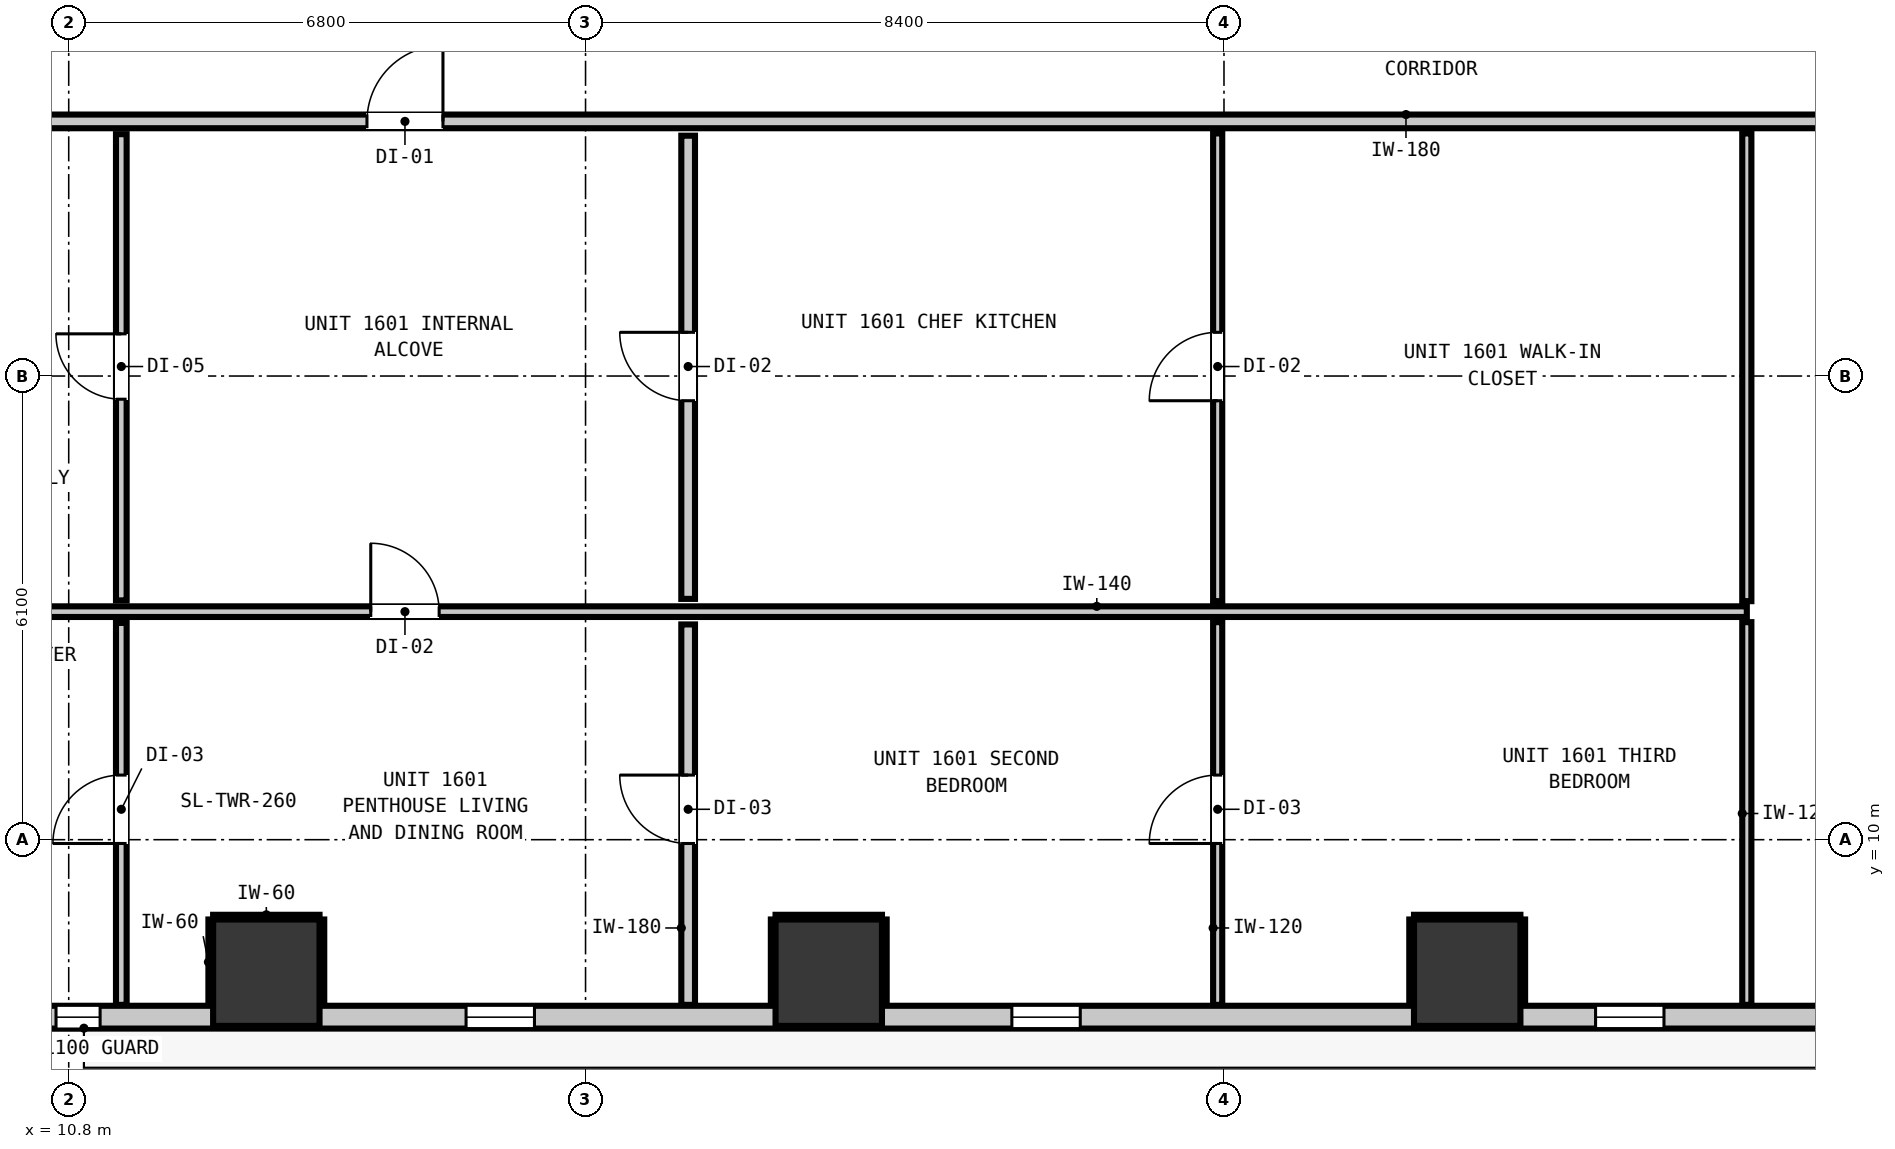
"""IFC4 building model, lengths in metres.
Left out: names, types, materials, properties, quantities, classifications, styles, units other than length and angle.
Written with IfcOpenShell. Run it as: python <this file> out.ifc"""

import sys

from ifc_helpers import new_model, si_unit, direction, frame, frame_2d, origin, origin_2d, place, context, subcontext, project, spatial, rectangle, extrude, element, fill, save


model = new_model("IFC4")
c1 = context("Model", 3, precision=1e-05, world=origin(), true_north=direction((0.0, 1.0)))
c2 = subcontext(c1, "Body", "Model", "MODEL_VIEW")
j1 = project(units=[si_unit("LENGTHUNIT", "METRE"), si_unit("PLANEANGLEUNIT", "RADIAN")], contexts=[c1])
p1 = place(None, origin())
s1 = spatial("IfcSite", under=j1, at=p1, CompositionType="ELEMENT")
p2 = place(p1, origin())
s2 = spatial("IfcBuilding", under=s1, at=p2, CompositionType="ELEMENT")
p3 = place(p2, frame((0.0, 0.0, 58.52)))
s3 = spatial("IfcBuildingStorey", under=s2, at=p3, CompositionType="ELEMENT", Elevation=58.52)
for number, where, z_axis, x_axis in (
    (1, (13.4, 8.25, 0.0), (0.0, 0.0, 1.0), (1.0, 0.0, 0.0)),
    (2, (20.8, 8.25, 0.0), (0.0, 0.0, 1.0), (1.0, 0.0, 0.0)),
    (3, (29.2, 8.25, 0.0), (0.0, 0.0, 1.0), (1.0, 0.0, 0.0)),
):
    element("IfcColumn", number, at=place(p3, frame(where, z_axis=z_axis, x_axis=x_axis)), inside=s3, PredefinedType="COLUMN", context=c2, shape_type="SweptSolid", body=[
        extrude(rectangle(XDim=1.4, YDim=1.4, at=origin_2d()), origin(), (0.0, 0.0, 1.0), 2.9),
    ])
p4 = place(p3, frame((47.835, 7.665, 0.0), z_axis=(0.0, 0.0, 1.0), x_axis=(-1.0, 0.0, 0.0)))
e4 = element("IfcWall", 4, at=p4, inside=s3, PredefinedType="STANDARD", context=c2, shape_type="SweptSolid", body=[
    extrude(rectangle(XDim=37.47, YDim=0.3, at=frame_2d((18.735, 0.0))), origin(), (0.0, 0.0, 1.0), 2.9),
])
p5 = place(p4, frame((0.901, 0.0, 0.0)))
e5 = element("IfcOpeningElement", 5, at=p5, cuts=e4, PredefinedType="OPENING", context=c2, shape_type="SweptSolid", body=[
    extrude(rectangle(XDim=1.0, YDim=2.15, at=frame_2d((0.5, 1.075))), frame((0.0, 0.16, 0.0), z_axis=(0.0, -1.0, 0.0), x_axis=(1.0, 0.0, 0.0)), (0.0, 0.0, 1.0), 0.32),
])
p6 = place(p4, frame((30.907, 0.0, 0.85)))
e6 = element("IfcOpeningElement", 6, at=p6, cuts=e4, PredefinedType="OPENING", context=c2, shape_type="SweptSolid", body=[
    extrude(rectangle(XDim=0.9, YDim=1.5, at=frame_2d((0.45, 0.75))), frame((0.0, 0.16, 0.0), z_axis=(0.0, -1.0, 0.0), x_axis=(1.0, 0.0, 0.0)), (0.0, 0.0, 1.0), 0.32),
])
p7 = place(p4, frame((36.622, 0.0, 0.85)))
e7 = element("IfcOpeningElement", 7, at=p7, cuts=e4, PredefinedType="OPENING", context=c2, shape_type="SweptSolid", body=[
    extrude(rectangle(XDim=0.58, YDim=1.5, at=frame_2d((0.29, 0.75))), frame((0.0, 0.16, 0.0), z_axis=(0.0, -1.0, 0.0), x_axis=(1.0, 0.0, 0.0)), (0.0, 0.0, 1.0), 0.32),
])
p8 = place(p4, frame((23.726, 0.0, 0.85)))
e8 = element("IfcOpeningElement", 8, at=p8, cuts=e4, PredefinedType="OPENING", context=c2, shape_type="SweptSolid", body=[
    extrude(rectangle(XDim=0.9, YDim=1.5, at=frame_2d((0.45, 0.75))), frame((0.0, 0.16, 0.0), z_axis=(0.0, -1.0, 0.0), x_axis=(1.0, 0.0, 0.0)), (0.0, 0.0, 1.0), 0.32),
])
p9 = place(p4, frame((16.046, 0.0, 0.85)))
e9 = element("IfcOpeningElement", 9, at=p9, cuts=e4, PredefinedType="OPENING", context=c2, shape_type="SweptSolid", body=[
    extrude(rectangle(XDim=0.9, YDim=1.5, at=frame_2d((0.45, 0.75))), frame((0.0, 0.16, 0.0), z_axis=(0.0, -1.0, 0.0), x_axis=(1.0, 0.0, 0.0)), (0.0, 0.0, 1.0), 0.32),
])
p10 = place(p4, frame((5.918, 0.0, 0.85)))
e10 = element("IfcOpeningElement", 10, at=p10, cuts=e4, PredefinedType="OPENING", context=c2, shape_type="SweptSolid", body=[
    extrude(rectangle(XDim=0.9, YDim=1.5, at=frame_2d((0.45, 0.75))), frame((0.0, 0.16, 0.0), z_axis=(0.0, -1.0, 0.0), x_axis=(1.0, 0.0, 0.0)), (0.0, 0.0, 1.0), 0.32),
])
p11 = place(p3, frame((8.027, 19.45, 0.0), z_axis=(0.0, 0.0, 1.0), x_axis=(1.0, 0.0, 0.0)))
e11 = element("IfcWall", 11, at=p11, inside=s3, PredefinedType="PARTITIONING", context=c2, shape_type="SweptSolid", body=[
    extrude(rectangle(XDim=42.146, YDim=0.18, at=frame_2d((21.073, 0.0))), origin(), (0.0, 0.0, 1.0), 2.9),
])
p12 = place(p11, frame((6.697, 0.0, 0.0)))
e12 = element("IfcOpeningElement", 12, at=p12, cuts=e11, PredefinedType="OPENING", context=c2, shape_type="SweptSolid", body=[
    extrude(rectangle(XDim=1.0, YDim=2.15, at=frame_2d((0.5, 1.075))), frame((0.0, 0.1, 0.0), z_axis=(0.0, -1.0, 0.0), x_axis=(1.0, 0.0, 0.0)), (0.0, 0.0, 1.0), 0.2),
])
p13 = place(p11, frame((33.038, 0.0, 0.0)))
e13 = element("IfcOpeningElement", 13, at=p13, cuts=e11, PredefinedType="OPENING", context=c2, shape_type="SweptSolid", body=[
    extrude(rectangle(XDim=0.9, YDim=2.1, at=frame_2d((0.45, 1.05))), frame((0.0, 0.1, 0.0), z_axis=(0.0, -1.0, 0.0), x_axis=(1.0, 0.0, 0.0)), (0.0, 0.0, 1.0), 0.2),
])
p14 = place(p3, frame((8.027, 13.0, 0.0), z_axis=(0.0, 0.0, 1.0), x_axis=(1.0, 0.0, 0.0)))
e14 = element("IfcWall", 14, at=p14, inside=s3, PredefinedType="PARTITIONING", context=c2, shape_type="SweptSolid", body=[
    extrude(rectangle(XDim=24.852, YDim=0.14, at=frame_2d((12.426, 0.0))), origin(), (0.0, 0.0, 1.0), 2.9),
])
p15 = place(p14, frame((6.747, 0.0, 0.0)))
e15 = element("IfcOpeningElement", 15, at=p15, cuts=e14, PredefinedType="OPENING", context=c2, shape_type="SweptSolid", body=[
    extrude(rectangle(XDim=0.9, YDim=2.1, at=frame_2d((0.45, 1.05))), frame((0.0, 0.08, 0.0), z_axis=(0.0, -1.0, 0.0), x_axis=(1.0, 0.0, 0.0)), (0.0, 0.0, 1.0), 0.16),
])
p16 = place(p3, frame((18.95, 7.827, 0.0), z_axis=(0.0, 0.0, 1.0), x_axis=(0.0, 1.0, 0.0)))
e16 = element("IfcWall", 16, at=p16, inside=s3, PredefinedType="PARTITIONING", context=c2, shape_type="SweptSolid", body=[
    extrude(rectangle(XDim=5.005, YDim=0.18, at=frame_2d((2.502, 0.0))), origin(), (0.0, 0.0, 1.0), 2.9),
])
p17 = place(p16, frame((2.123, 0.0, 0.0)))
e17 = element("IfcOpeningElement", 17, at=p17, cuts=e16, PredefinedType="OPENING", context=c2, shape_type="SweptSolid", body=[
    extrude(rectangle(XDim=0.9, YDim=2.1, at=frame_2d((0.45, 1.05))), frame((0.0, 0.1, 0.0), z_axis=(0.0, -1.0, 0.0), x_axis=(1.0, 0.0, 0.0)), (0.0, 0.0, 1.0), 0.2),
])
p18 = place(p3, frame((18.95, 13.168, 0.0), z_axis=(0.0, 0.0, 1.0), x_axis=(0.0, 1.0, 0.0)))
e18 = element("IfcWall", 18, at=p18, inside=s3, PredefinedType="PARTITIONING", context=c2, shape_type="SweptSolid", body=[
    extrude(rectangle(XDim=6.094, YDim=0.18, at=frame_2d((3.047, 0.0))), origin(), (0.0, 0.0, 1.0), 2.9),
])
p19 = place(p18, frame((2.607, 0.0, 0.0)))
e19 = element("IfcOpeningElement", 19, at=p19, cuts=e18, PredefinedType="OPENING", context=c2, shape_type="SweptSolid", body=[
    extrude(rectangle(XDim=0.9, YDim=2.1, at=frame_2d((0.45, 1.05))), frame((0.0, 0.1, 0.0), z_axis=(0.0, -1.0, 0.0), x_axis=(1.0, 0.0, 0.0)), (0.0, 0.0, 1.0), 0.2),
])
p20 = place(p3, frame((11.492, 7.827, 0.0), z_axis=(0.0, 0.0, 1.0), x_axis=(0.0, 1.0, 0.0)))
e20 = element("IfcWall", 20, at=p20, inside=s3, PredefinedType="PARTITIONING", context=c2, shape_type="SweptSolid", body=[
    extrude(rectangle(XDim=5.025, YDim=0.14, at=frame_2d((2.513, 0.0))), origin(), (0.0, 0.0, 1.0), 2.9),
])
p21 = place(p20, frame((2.123, 0.0, 0.0)))
e21 = element("IfcOpeningElement", 21, at=p21, cuts=e20, PredefinedType="OPENING", context=c2, shape_type="SweptSolid", body=[
    extrude(rectangle(XDim=0.9, YDim=2.1, at=frame_2d((0.45, 1.05))), frame((0.0, 0.08, 0.0), z_axis=(0.0, -1.0, 0.0), x_axis=(1.0, 0.0, 0.0)), (0.0, 0.0, 1.0), 0.16),
])
p22 = place(p3, frame((11.492, 13.148, 0.0), z_axis=(0.0, 0.0, 1.0), x_axis=(0.0, 1.0, 0.0)))
e22 = element("IfcWall", 22, at=p22, inside=s3, PredefinedType="PARTITIONING", context=c2, shape_type="SweptSolid", body=[
    extrude(rectangle(XDim=6.134, YDim=0.14, at=frame_2d((3.067, 0.0))), origin(), (0.0, 0.0, 1.0), 2.9),
])
p23 = place(p22, frame((2.647, 0.0, 0.0)))
e23 = element("IfcOpeningElement", 23, at=p23, cuts=e22, PredefinedType="OPENING", context=c2, shape_type="SweptSolid", body=[
    extrude(rectangle(XDim=0.86, YDim=2.02, at=frame_2d((0.43, 1.01))), frame((0.0, 0.08, 0.0), z_axis=(0.0, -1.0, 0.0), x_axis=(1.0, 0.0, 0.0)), (0.0, 0.0, 1.0), 0.16),
])
p24 = place(p3, frame((25.917, 7.827, 0.0), z_axis=(0.0, 0.0, 1.0), x_axis=(0.0, 1.0, 0.0)))
e24 = element("IfcWall", 24, at=p24, inside=s3, PredefinedType="PARTITIONING", context=c2, shape_type="SweptSolid", body=[
    extrude(rectangle(XDim=5.035, YDim=0.12, at=frame_2d((2.518, 0.0))), origin(), (0.0, 0.0, 1.0), 2.9),
])
p25 = place(p24, frame((2.123, 0.0, 0.0)))
e25 = element("IfcOpeningElement", 25, at=p25, cuts=e24, PredefinedType="OPENING", context=c2, shape_type="SweptSolid", body=[
    extrude(rectangle(XDim=0.9, YDim=2.1, at=frame_2d((0.45, 1.05))), frame((0.0, 0.07, 0.0), z_axis=(0.0, -1.0, 0.0), x_axis=(1.0, 0.0, 0.0)), (0.0, 0.0, 1.0), 0.14),
])
p26 = place(p3, frame((25.917, 13.138, 0.0), z_axis=(0.0, 0.0, 1.0), x_axis=(0.0, 1.0, 0.0)))
e26 = element("IfcWall", 26, at=p26, inside=s3, PredefinedType="PARTITIONING", context=c2, shape_type="SweptSolid", body=[
    extrude(rectangle(XDim=6.154, YDim=0.12, at=frame_2d((3.077, 0.0))), origin(), (0.0, 0.0, 1.0), 2.9),
])
p27 = place(p26, frame((2.637, 0.0, 0.0)))
e27 = element("IfcOpeningElement", 27, at=p27, cuts=e26, PredefinedType="OPENING", context=c2, shape_type="SweptSolid", body=[
    extrude(rectangle(XDim=0.9, YDim=2.1, at=frame_2d((0.45, 1.05))), frame((0.0, 0.07, 0.0), z_axis=(0.0, -1.0, 0.0), x_axis=(1.0, 0.0, 0.0)), (0.0, 0.0, 1.0), 0.14),
])
p28 = place(p3, frame((32.879, 7.827, 0.0), z_axis=(0.0, 0.0, 1.0), x_axis=(0.0, 1.0, 0.0)))
e28 = element("IfcWall", 28, at=p28, inside=s3, PredefinedType="PARTITIONING", context=c2, shape_type="SweptSolid", body=[
    extrude(rectangle(XDim=5.035, YDim=0.12, at=frame_2d((2.518, 0.0))), origin(), (0.0, 0.0, 1.0), 2.9),
])
p29 = place(p3, frame((32.879, 13.138, 0.0), z_axis=(0.0, 0.0, 1.0), x_axis=(0.0, 1.0, 0.0)))
e29 = element("IfcWall", 29, at=p29, inside=s3, PredefinedType="PARTITIONING", context=c2, shape_type="SweptSolid", body=[
    extrude(rectangle(XDim=6.154, YDim=0.12, at=frame_2d((3.077, 0.0))), origin(), (0.0, 0.0, 1.0), 2.9),
])
p30 = place(p3, frame((12.7, 8.982, 0.0), z_axis=(0.0, 0.0, 1.0), x_axis=(1.0, 0.0, 0.0)))
e30 = element("IfcWall", 30, at=p30, inside=s3, PredefinedType="PARTITIONING", context=c2, shape_type="SweptSolid", body=[
    extrude(rectangle(XDim=1.4, YDim=0.06, at=frame_2d((0.7, 0.0))), origin(), (0.0, 0.0, 1.0), 1.45),
])
for number, where, z_axis, x_axis in (
    (31, (12.668, 7.83, 0.0), (0.0, 0.0, 1.0), (0.0, 1.0, 0.0)),
    (32, (14.132, 7.83, 0.0), (0.0, 0.0, 1.0), (0.0, 1.0, 0.0)),
):
    element("IfcWall", number, at=place(p3, frame(where, z_axis=z_axis, x_axis=x_axis)), inside=s3, PredefinedType="PARTITIONING", context=c2, shape_type="SweptSolid", body=[
        extrude(rectangle(XDim=1.12, YDim=0.06, at=frame_2d((0.56, 0.0))), origin(), (0.0, 0.0, 1.0), 1.45),
    ])
p31 = place(p3, frame((20.1, 8.982, 0.0), z_axis=(0.0, 0.0, 1.0), x_axis=(1.0, 0.0, 0.0)))
e33 = element("IfcWall", 33, at=p31, inside=s3, PredefinedType="PARTITIONING", context=c2, shape_type="SweptSolid", body=[
    extrude(rectangle(XDim=1.4, YDim=0.06, at=frame_2d((0.7, 0.0))), origin(), (0.0, 0.0, 1.0), 1.45),
])
for number, where, z_axis, x_axis in (
    (34, (20.068, 7.83, 0.0), (0.0, 0.0, 1.0), (0.0, 1.0, 0.0)),
    (35, (21.532, 7.83, 0.0), (0.0, 0.0, 1.0), (0.0, 1.0, 0.0)),
):
    element("IfcWall", number, at=place(p3, frame(where, z_axis=z_axis, x_axis=x_axis)), inside=s3, PredefinedType="PARTITIONING", context=c2, shape_type="SweptSolid", body=[
        extrude(rectangle(XDim=1.12, YDim=0.06, at=frame_2d((0.56, 0.0))), origin(), (0.0, 0.0, 1.0), 1.45),
    ])
p32 = place(p3, frame((28.5, 8.982, 0.0), z_axis=(0.0, 0.0, 1.0), x_axis=(1.0, 0.0, 0.0)))
e36 = element("IfcWall", 36, at=p32, inside=s3, PredefinedType="PARTITIONING", context=c2, shape_type="SweptSolid", body=[
    extrude(rectangle(XDim=1.4, YDim=0.06, at=frame_2d((0.7, 0.0))), origin(), (0.0, 0.0, 1.0), 1.45),
])
for number, where, z_axis, x_axis in (
    (37, (28.468, 7.83, 0.0), (0.0, 0.0, 1.0), (0.0, 1.0, 0.0)),
    (38, (29.932, 7.83, 0.0), (0.0, 0.0, 1.0), (0.0, 1.0, 0.0)),
):
    element("IfcWall", number, at=place(p3, frame(where, z_axis=z_axis, x_axis=x_axis)), inside=s3, PredefinedType="PARTITIONING", context=c2, shape_type="SweptSolid", body=[
        extrude(rectangle(XDim=1.12, YDim=0.06, at=frame_2d((0.56, 0.0))), origin(), (0.0, 0.0, 1.0), 1.45),
    ])
p33 = place(p6, origin())
e39 = element("IfcWindow", 39, at=p33, inside=s3, PartitioningType="SINGLE_PANEL", PredefinedType="WINDOW", context=c2, shape_type="SweptSolid", body=[
    extrude(rectangle(XDim=0.9, YDim=1.5, at=frame_2d((0.45, 0.75))), frame((0.0, 0.03, 0.0), z_axis=(0.0, -1.0, 0.0), x_axis=(1.0, 0.0, 0.0)), (0.0, 0.0, 1.0), 0.06),
])
fill(e6, e39)
p34 = place(p7, origin())
e40 = element("IfcWindow", 40, at=p34, inside=s3, PartitioningType="SINGLE_PANEL", PredefinedType="WINDOW", context=c2, shape_type="SweptSolid", body=[
    extrude(rectangle(XDim=0.58, YDim=1.5, at=frame_2d((0.29, 0.75))), frame((0.0, 0.03, 0.0), z_axis=(0.0, -1.0, 0.0), x_axis=(1.0, 0.0, 0.0)), (0.0, 0.0, 1.0), 0.06),
])
fill(e7, e40)
p35 = place(p8, origin())
e41 = element("IfcWindow", 41, at=p35, inside=s3, PartitioningType="SINGLE_PANEL", PredefinedType="WINDOW", context=c2, shape_type="SweptSolid", body=[
    extrude(rectangle(XDim=0.9, YDim=1.5, at=frame_2d((0.45, 0.75))), frame((0.0, 0.03, 0.0), z_axis=(0.0, -1.0, 0.0), x_axis=(1.0, 0.0, 0.0)), (0.0, 0.0, 1.0), 0.06),
])
fill(e8, e41)
p36 = place(p9, origin())
e42 = element("IfcWindow", 42, at=p36, inside=s3, PartitioningType="SINGLE_PANEL", PredefinedType="WINDOW", context=c2, shape_type="SweptSolid", body=[
    extrude(rectangle(XDim=0.9, YDim=1.5, at=frame_2d((0.45, 0.75))), frame((0.0, 0.03, 0.0), z_axis=(0.0, -1.0, 0.0), x_axis=(1.0, 0.0, 0.0)), (0.0, 0.0, 1.0), 0.06),
])
fill(e9, e42)
p37 = place(p12, origin())
e43 = element("IfcDoor", 43, at=p37, inside=s3, OperationType="SINGLE_SWING_RIGHT", PredefinedType="DOOR", context=c2, shape_type="SweptSolid", body=[
    extrude(rectangle(XDim=1.0, YDim=2.15, at=frame_2d((0.5, 1.075))), frame((0.0, 0.025, 0.0), z_axis=(0.0, -1.0, 0.0), x_axis=(1.0, 0.0, 0.0)), (0.0, 0.0, 1.0), 0.05),
])
fill(e12, e43)
p38 = place(p15, origin())
e44 = element("IfcDoor", 44, at=p38, inside=s3, OperationType="SINGLE_SWING_LEFT", PredefinedType="DOOR", context=c2, shape_type="SweptSolid", body=[
    extrude(rectangle(XDim=0.9, YDim=2.1, at=frame_2d((0.45, 1.05))), frame((0.0, 0.025, 0.0), z_axis=(0.0, -1.0, 0.0), x_axis=(1.0, 0.0, 0.0)), (0.0, 0.0, 1.0), 0.05),
])
fill(e15, e44)
p39 = place(p23, origin())
e45 = element("IfcDoor", 45, at=p39, inside=s3, OperationType="SINGLE_SWING_RIGHT", PredefinedType="DOOR", context=c2, shape_type="SweptSolid", body=[
    extrude(rectangle(XDim=0.86, YDim=2.02, at=frame_2d((0.43, 1.01))), frame((0.0, 0.025, 0.0), z_axis=(0.0, -1.0, 0.0), x_axis=(1.0, 0.0, 0.0)), (0.0, 0.0, 1.0), 0.05),
])
fill(e23, e45)
p40 = place(p21, origin())
e46 = element("IfcDoor", 46, at=p40, inside=s3, OperationType="SINGLE_SWING_LEFT", PredefinedType="DOOR", context=c2, shape_type="SweptSolid", body=[
    extrude(rectangle(XDim=0.9, YDim=2.1, at=frame_2d((0.45, 1.05))), frame((0.0, 0.025, 0.0), z_axis=(0.0, -1.0, 0.0), x_axis=(1.0, 0.0, 0.0)), (0.0, 0.0, 1.0), 0.05),
])
fill(e21, e46)
p41 = place(p19, origin())
e47 = element("IfcDoor", 47, at=p41, inside=s3, OperationType="SINGLE_SWING_RIGHT", PredefinedType="DOOR", context=c2, shape_type="SweptSolid", body=[
    extrude(rectangle(XDim=0.9, YDim=2.1, at=frame_2d((0.45, 1.05))), frame((0.0, 0.025, 0.0), z_axis=(0.0, -1.0, 0.0), x_axis=(1.0, 0.0, 0.0)), (0.0, 0.0, 1.0), 0.05),
])
fill(e19, e47)
p42 = place(p27, origin())
e48 = element("IfcDoor", 48, at=p42, inside=s3, OperationType="SINGLE_SWING_LEFT", PredefinedType="DOOR", context=c2, shape_type="SweptSolid", body=[
    extrude(rectangle(XDim=0.9, YDim=2.1, at=frame_2d((0.45, 1.05))), frame((0.0, 0.025, 0.0), z_axis=(0.0, -1.0, 0.0), x_axis=(1.0, 0.0, 0.0)), (0.0, 0.0, 1.0), 0.05),
])
fill(e27, e48)
p43 = place(p17, origin())
e49 = element("IfcDoor", 49, at=p43, inside=s3, OperationType="SINGLE_SWING_RIGHT", PredefinedType="DOOR", context=c2, shape_type="SweptSolid", body=[
    extrude(rectangle(XDim=0.9, YDim=2.1, at=frame_2d((0.45, 1.05))), frame((0.0, 0.025, 0.0), z_axis=(0.0, -1.0, 0.0), x_axis=(1.0, 0.0, 0.0)), (0.0, 0.0, 1.0), 0.05),
])
fill(e17, e49)
p44 = place(p25, origin())
e50 = element("IfcDoor", 50, at=p44, inside=s3, OperationType="SINGLE_SWING_LEFT", PredefinedType="DOOR", context=c2, shape_type="SweptSolid", body=[
    extrude(rectangle(XDim=0.9, YDim=2.1, at=frame_2d((0.45, 1.05))), frame((0.0, 0.025, 0.0), z_axis=(0.0, -1.0, 0.0), x_axis=(1.0, 0.0, 0.0)), (0.0, 0.0, 1.0), 0.05),
])
fill(e25, e50)
save(model, sys.argv[1])
